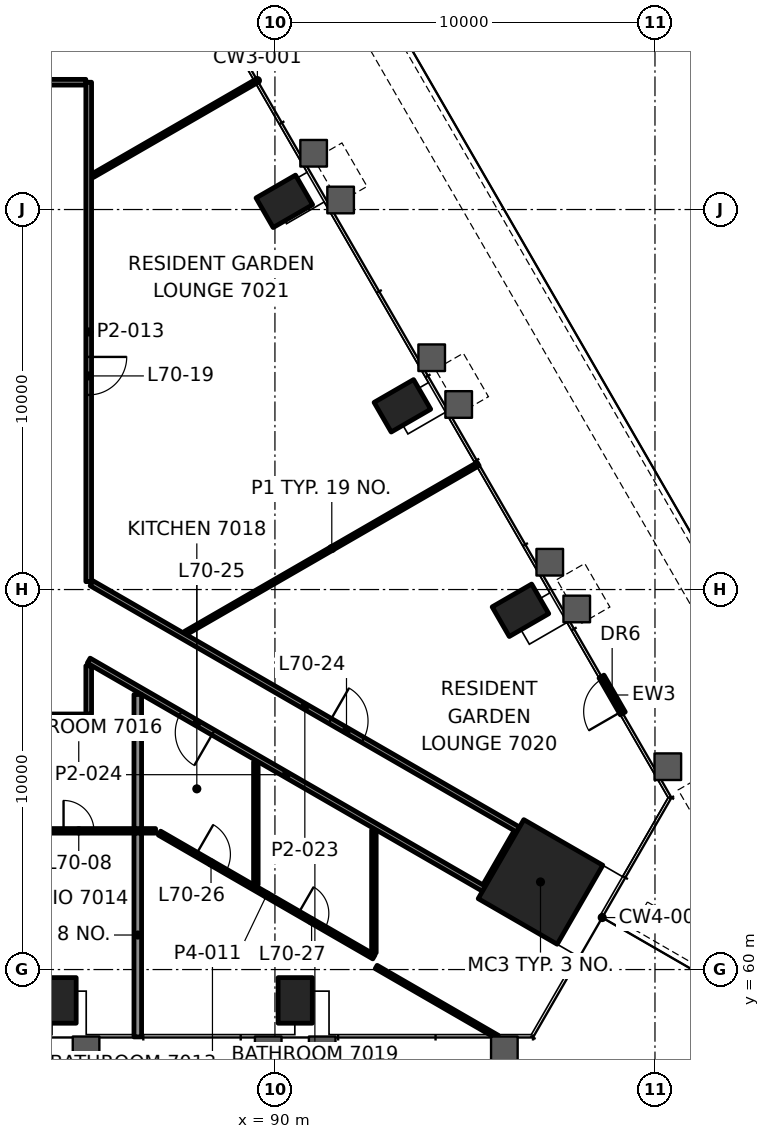
"""IFC4 building model, lengths in metres.
Left out: names, types, materials, properties, quantities, classifications, styles, units other than length and angle.
Written with IfcOpenShell. Run it as: python <this file> out.ifc"""

import sys

from ifc_helpers import new_model, si_unit, direction, frame, frame_2d, origin, origin_2d, place, context, subcontext, project, spatial, rectangle, hollow_rectangle, extrude, element, fill, save


model = new_model("IFC4")
c1 = context("Model", 3, precision=1e-05, world=origin(), true_north=direction((0.0, 1.0)))
c2 = subcontext(c1, "Body", "Model", "MODEL_VIEW")
j1 = project(units=[si_unit("LENGTHUNIT", "METRE"), si_unit("PLANEANGLEUNIT", "RADIAN")], contexts=[c1])
p1 = place(None, origin())
s1 = spatial("IfcSite", under=j1, at=p1, CompositionType="ELEMENT")
p2 = place(p1, origin())
s2 = spatial("IfcBuilding", under=s1, at=p2, CompositionType="ELEMENT")
p3 = place(p2, frame((0.0, 0.0, 291.6)))
s3 = spatial("IfcBuildingStorey", under=s2, at=p3, CompositionType="ELEMENT", Elevation=291.6)
p4 = place(p3, frame((96.988, 62.305, 0.0), z_axis=(0.0, 0.0, 1.0), x_axis=(0.5, 0.866025403784, 0.0)))
e1 = element("IfcColumn", 1, at=p4, inside=s3, PredefinedType="COLUMN", context=c2, shape_type="SweptSolid", body=[
    extrude(rectangle(XDim=2.4, YDim=2.4, at=origin_2d()), origin(), (0.0, 0.0, 1.0), 3.5),
])
for number, where, z_axis, x_axis in (
    (2, (84.32, 59.188, -0.0), (0.0, 0.0, 1.0), (1.0, 0.0, 0.0)),
    (3, (90.533, 59.188, -0.0), (0.0, 0.0, 1.0), (1.0, 0.0, 0.0)),
    (4, (96.461, 69.454, -0.0), (0.0, 0.0, 1.0), (-0.5, 0.866, 0.0)),
    (5, (93.354, 74.835, -0.0), (0.0, 0.0, 1.0), (-0.5, 0.866, 0.0)),
    (6, (90.247, 80.216, -0.0), (0.0, 0.0, 1.0), (-0.5, 0.866, 0.0)),
):
    element("IfcColumn", number, at=place(p3, frame(where, z_axis=z_axis, x_axis=x_axis)), inside=s3, PredefinedType="COLUMN", context=c2, shape_type="SweptSolid", body=[
        extrude(hollow_rectangle(XDim=0.9, YDim=1.2, WallThickness=0.06, at=origin_2d()), origin(), (0.0, 0.0, 1.0), 3.5),
    ])
p5 = place(p3, frame((63.141, 63.65, 0.0), z_axis=(0.0, 0.0, 1.0), x_axis=(1.0, 0.0, 0.0)))
e7 = element("IfcWall", 7, at=p5, inside=s3, PredefinedType="PARTITIONING", context=c2, shape_type="SweptSolid", body=[
    extrude(rectangle(XDim=23.718, YDim=0.12, at=frame_2d((11.859, 0.0))), origin(), (0.0, 0.0, 1.0), 2.7),
])
p6 = place(p5, frame((1.276, 0.0, 0.0)))
e8 = element("IfcOpeningElement", 8, at=p6, cuts=e7, PredefinedType="OPENING", context=c2, shape_type="SweptSolid", body=[
    extrude(rectangle(XDim=0.8, YDim=2.1, at=frame_2d((0.4, 1.05))), frame((0.0, 0.07, 0.0), z_axis=(0.0, -1.0, 0.0), x_axis=(1.0, 0.0, 0.0)), (0.0, 0.0, 1.0), 0.14),
])
p7 = place(p5, frame((3.43, 0.0, 0.0)))
e9 = element("IfcOpeningElement", 9, at=p7, cuts=e7, PredefinedType="OPENING", context=c2, shape_type="SweptSolid", body=[
    extrude(rectangle(XDim=0.9, YDim=2.1, at=frame_2d((0.45, 1.05))), frame((0.0, 0.07, 0.0), z_axis=(0.0, -1.0, 0.0), x_axis=(1.0, 0.0, 0.0)), (0.0, 0.0, 1.0), 0.14),
])
p8 = place(p5, frame((5.715, 0.0, 0.0)))
e10 = element("IfcOpeningElement", 10, at=p8, cuts=e7, PredefinedType="OPENING", context=c2, shape_type="SweptSolid", body=[
    extrude(rectangle(XDim=0.9, YDim=2.1, at=frame_2d((0.45, 1.05))), frame((0.0, 0.07, 0.0), z_axis=(0.0, -1.0, 0.0), x_axis=(1.0, 0.0, 0.0)), (0.0, 0.0, 1.0), 0.14),
])
p9 = place(p5, frame((8.87, 0.0, 0.0)))
e11 = element("IfcOpeningElement", 11, at=p9, cuts=e7, PredefinedType="OPENING", context=c2, shape_type="SweptSolid", body=[
    extrude(rectangle(XDim=0.8, YDim=2.1, at=frame_2d((0.4, 1.05))), frame((0.0, 0.07, 0.0), z_axis=(0.0, -1.0, 0.0), x_axis=(1.0, 0.0, 0.0)), (0.0, 0.0, 1.0), 0.14),
])
p10 = place(p5, frame((11.928, 0.0, 0.0)))
e12 = element("IfcOpeningElement", 12, at=p10, cuts=e7, PredefinedType="OPENING", context=c2, shape_type="SweptSolid", body=[
    extrude(rectangle(XDim=0.9, YDim=2.1, at=frame_2d((0.45, 1.05))), frame((0.0, 0.07, 0.0), z_axis=(0.0, -1.0, 0.0), x_axis=(1.0, 0.0, 0.0)), (0.0, 0.0, 1.0), 0.14),
])
p11 = place(p5, frame((15.083, 0.0, 0.0)))
e13 = element("IfcOpeningElement", 13, at=p11, cuts=e7, PredefinedType="OPENING", context=c2, shape_type="SweptSolid", body=[
    extrude(rectangle(XDim=0.8, YDim=2.1, at=frame_2d((0.4, 1.05))), frame((0.0, 0.07, 0.0), z_axis=(0.0, -1.0, 0.0), x_axis=(1.0, 0.0, 0.0)), (0.0, 0.0, 1.0), 0.14),
])
p12 = place(p5, frame((18.141, 0.0, 0.0)))
e14 = element("IfcOpeningElement", 14, at=p12, cuts=e7, PredefinedType="OPENING", context=c2, shape_type="SweptSolid", body=[
    extrude(rectangle(XDim=0.9, YDim=2.1, at=frame_2d((0.45, 1.05))), frame((0.0, 0.07, 0.0), z_axis=(0.0, -1.0, 0.0), x_axis=(1.0, 0.0, 0.0)), (0.0, 0.0, 1.0), 0.14),
])
p13 = place(p5, frame((21.297, 0.0, 0.0)))
e15 = element("IfcOpeningElement", 15, at=p13, cuts=e7, PredefinedType="OPENING", context=c2, shape_type="SweptSolid", body=[
    extrude(rectangle(XDim=0.8, YDim=2.1, at=frame_2d((0.4, 1.05))), frame((0.0, 0.07, 0.0), z_axis=(0.0, -1.0, 0.0), x_axis=(1.0, 0.0, 0.0)), (0.0, 0.0, 1.0), 0.14),
])
p14 = place(p3, frame((85.1, 66.65, 0.0), z_axis=(0.0, 0.0, 1.0), x_axis=(-1.0, 0.0, 0.0)))
e16 = element("IfcWall", 16, at=p14, inside=s3, PredefinedType="PARTITIONING", context=c2, shape_type="SweptSolid", body=[
    extrude(rectangle(XDim=20.2, YDim=0.15, at=frame_2d((10.1, 0.0))), origin(), (0.0, 0.0, 1.0), 2.7),
])
p15 = place(p14, frame((2.869, 0.0, 0.0)))
e17 = element("IfcOpeningElement", 17, at=p15, cuts=e16, PredefinedType="OPENING", context=c2, shape_type="SweptSolid", body=[
    extrude(rectangle(XDim=1.0, YDim=2.1, at=frame_2d((0.5, 1.05))), frame((0.0, 0.085, 0.0), z_axis=(0.0, -1.0, 0.0), x_axis=(1.0, 0.0, 0.0)), (0.0, 0.0, 1.0), 0.17),
])
p16 = place(p14, frame((9.082, 0.0, 0.0)))
e18 = element("IfcOpeningElement", 18, at=p16, cuts=e16, PredefinedType="OPENING", context=c2, shape_type="SweptSolid", body=[
    extrude(rectangle(XDim=1.0, YDim=2.1, at=frame_2d((0.5, 1.05))), frame((0.0, 0.085, 0.0), z_axis=(0.0, -1.0, 0.0), x_axis=(1.0, 0.0, 0.0)), (0.0, 0.0, 1.0), 0.17),
])
p17 = place(p14, frame((15.296, 0.0, 0.0)))
e19 = element("IfcOpeningElement", 19, at=p17, cuts=e16, PredefinedType="OPENING", context=c2, shape_type="SweptSolid", body=[
    extrude(rectangle(XDim=1.0, YDim=2.1, at=frame_2d((0.5, 1.05))), frame((0.0, 0.085, 0.0), z_axis=(0.0, -1.0, 0.0), x_axis=(1.0, 0.0, 0.0)), (0.0, 0.0, 1.0), 0.17),
])
p18 = place(p3, frame((78.2, 83.35, 0.0), z_axis=(0.0, 0.0, 1.0), x_axis=(1.0, 0.0, 0.0)))
e20 = element("IfcWall", 20, at=p18, inside=s3, PredefinedType="PARTITIONING", context=c2, shape_type="SweptSolid", body=[
    extrude(rectangle(XDim=6.824, YDim=0.15, at=frame_2d((3.412, 0.0))), origin(), (0.0, 0.0, 1.0), 2.7),
])
p19 = place(p18, frame((2.912, 0.0, 0.0)))
e21 = element("IfcOpeningElement", 21, at=p19, cuts=e20, PredefinedType="OPENING", context=c2, shape_type="SweptSolid", body=[
    extrude(rectangle(XDim=1.0, YDim=2.1, at=frame_2d((0.5, 1.05))), frame((0.0, 0.085, 0.0), z_axis=(0.0, -1.0, 0.0), x_axis=(1.0, 0.0, 0.0)), (0.0, 0.0, 1.0), 0.17),
])
p20 = place(p3, frame((87.645, 68.855, 0.0), z_axis=(0.0, 0.0, 1.0), x_axis=(0.866023307551, 0.500003630766, 0.0)))
e22 = element("IfcWall", 22, at=p20, inside=s3, PredefinedType="PARTITIONING", context=c2, shape_type="SweptSolid", body=[
    extrude(rectangle(XDim=8.894, YDim=0.1, at=frame_2d((4.447, 0.0))), origin(), (0.0, 0.0, 1.0), 2.688),
])
p21 = place(p3, frame((85.201, 80.89, 0.0), z_axis=(0.0, 0.0, 1.0), x_axis=(0.866025995923, 0.499998974385, 0.0)))
e23 = element("IfcWall", 23, at=p21, inside=s3, PredefinedType="PARTITIONING", context=c2, shape_type="SweptSolid", body=[
    extrude(rectangle(XDim=4.993, YDim=0.1, at=frame_2d((2.497, 0.0))), origin(), (0.0, 0.0, 1.0), 2.688),
])
p22 = place(p3, frame((95.536, 62.191, 0.0), z_axis=(0.0, 0.0, 1.0), x_axis=(0.500008692254, 0.866020385251, 0.0)))
e24 = element("IfcWall", 24, at=p22, inside=s3, PredefinedType="PARTITIONING", context=c2, shape_type="SweptSolid", body=[
    extrude(rectangle(XDim=1.649, YDim=0.15, at=frame_2d((0.824, 0.0))), origin(), (0.0, 0.0, 1.0), 2.547),
])
p23 = place(p3, frame((92.604, 60.442, 0.0), z_axis=(0.0, 0.0, 1.0), x_axis=(0.0, 1.0, 0.0)))
e25 = element("IfcWall", 25, at=p23, inside=s3, PredefinedType="PARTITIONING", context=c2, shape_type="SweptSolid", body=[
    extrude(rectangle(XDim=3.228, YDim=0.12, at=frame_2d((1.614, 0.0))), origin(), (0.0, 0.0, 1.0), 2.7),
])
p24 = place(p3, frame((89.498, 62.236, 0.0), z_axis=(0.0, 0.0, 1.0), x_axis=(0.0, 1.0, 0.0)))
e26 = element("IfcWall", 26, at=p24, inside=s3, PredefinedType="PARTITIONING", context=c2, shape_type="SweptSolid", body=[
    extrude(rectangle(XDim=3.228, YDim=0.12, at=frame_2d((1.614, 0.0))), origin(), (0.0, 0.0, 1.0), 2.547),
])
p25 = place(p3, frame((86.391, 58.228, 0.0), z_axis=(0.0, 0.0, 1.0), x_axis=(0.0, 1.0, 0.0)))
e27 = element("IfcWall", 27, at=p25, inside=s3, PredefinedType="PARTITIONING", context=c2, shape_type="SweptSolid", body=[
    extrude(rectangle(XDim=5.363, YDim=0.2, at=frame_2d((2.681, 0.0))), origin(), (0.0, 0.0, 1.0), 2.7),
])
p26 = place(p3, frame((85.1, 66.725, 0.0), z_axis=(0.0, 0.0, 1.0), x_axis=(0.0, 1.0, 0.0)))
e28 = element("IfcWall", 28, at=p26, inside=s3, PredefinedType="PARTITIONING", context=c2, shape_type="SweptSolid", body=[
    extrude(rectangle(XDim=1.268, YDim=0.15, at=frame_2d((0.634, 0.0))), origin(), (0.0, 0.0, 1.0), 2.547),
])
p27 = place(p3, frame((85.1, 83.35, 0.0), z_axis=(0.0, 0.0, 1.0), x_axis=(0.0, -1.0, 0.0)))
e29 = element("IfcWall", 29, at=p27, inside=s3, PredefinedType="PARTITIONING", context=c2, shape_type="SweptSolid", body=[
    extrude(rectangle(XDim=13.142, YDim=0.15, at=frame_2d((6.571, 0.0))), origin(), (0.0, 0.0, 1.0), 2.7),
])
p28 = place(p27, frame((7.228, 0.0, 0.0)))
e30 = element("IfcOpeningElement", 30, at=p28, cuts=e29, PredefinedType="OPENING", context=c2, shape_type="SweptSolid", body=[
    extrude(rectangle(XDim=1.0, YDim=2.1, at=frame_2d((0.5, 1.05))), frame((0.0, 0.085, 0.0), z_axis=(0.0, -1.0, 0.0), x_axis=(1.0, 0.0, 0.0)), (0.0, 0.0, 1.0), 0.17),
])
p29 = place(p3, frame((85.175, 70.165, 0.0), z_axis=(0.0, 0.0, 1.0), x_axis=(0.866023706001, -0.500002940635, 0.0)))
e31 = element("IfcWall", 31, at=p29, inside=s3, PredefinedType="PARTITIONING", context=c2, shape_type="SweptSolid", body=[
    extrude(rectangle(XDim=12.959, YDim=0.15, at=frame_2d((6.48, 0.0))), origin(), (0.0, 0.0, 1.0), 2.7),
])
p30 = place(p29, frame((7.246, 0.0, 0.0)))
e32 = element("IfcOpeningElement", 32, at=p30, cuts=e31, PredefinedType="OPENING", context=c2, shape_type="SweptSolid", body=[
    extrude(rectangle(XDim=1.0, YDim=2.1, at=frame_2d((0.5, 1.05))), frame((0.0, 0.085, 0.0), z_axis=(0.0, -1.0, 0.0), x_axis=(1.0, 0.0, 0.0)), (0.0, 0.0, 1.0), 0.17),
])
p31 = place(p3, frame((95.498, 62.126, 0.0), z_axis=(0.0, 0.0, 1.0), x_axis=(-0.866024746207, 0.500001138955, 0.0)))
e33 = element("IfcWall", 33, at=p31, inside=s3, PredefinedType="PARTITIONING", context=c2, shape_type="SweptSolid", body=[
    extrude(rectangle(XDim=12.007, YDim=0.15, at=frame_2d((6.003, 0.0))), origin(), (0.0, 0.0, 1.0), 2.547),
])
p32 = place(p31, frame((8.222, 0.0, 0.0)))
e34 = element("IfcOpeningElement", 34, at=p32, cuts=e33, PredefinedType="OPENING", context=c2, shape_type="SweptSolid", body=[
    extrude(rectangle(XDim=1.0, YDim=2.1, at=frame_2d((0.5, 1.05))), frame((0.0, 0.085, 0.0), z_axis=(0.0, -1.0, 0.0), x_axis=(1.0, 0.0, 0.0)), (0.0, 0.0, 1.0), 0.17),
])
p33 = place(p3, frame((86.963, 63.59, 0.0), z_axis=(0.0, 0.0, 1.0), x_axis=(0.866025198843, -0.500000354968, 0.0)))
e35 = element("IfcWall", 35, at=p33, inside=s3, PredefinedType="PARTITIONING", context=c2, shape_type="SweptSolid", body=[
    extrude(rectangle(XDim=6.515, YDim=0.12, at=frame_2d((3.257, 0.0))), origin(), (0.0, 0.0, 1.0), 2.7),
])
p34 = place(p33, frame((1.115, 0.0, 0.0)))
e36 = element("IfcOpeningElement", 36, at=p34, cuts=e35, PredefinedType="OPENING", context=c2, shape_type="SweptSolid", body=[
    extrude(rectangle(XDim=0.9, YDim=2.1, at=frame_2d((0.45, 1.05))), frame((0.0, 0.07, 0.0), z_axis=(0.0, -1.0, 0.0), x_axis=(1.0, 0.0, 0.0)), (0.0, 0.0, 1.0), 0.14),
])
p35 = place(p33, frame((4.221, 0.0, 0.0)))
e37 = element("IfcOpeningElement", 37, at=p35, cuts=e35, PredefinedType="OPENING", context=c2, shape_type="SweptSolid", body=[
    extrude(rectangle(XDim=0.8, YDim=2.1, at=frame_2d((0.4, 1.05))), frame((0.0, 0.07, 0.0), z_axis=(0.0, -1.0, 0.0), x_axis=(1.0, 0.0, 0.0)), (0.0, 0.0, 1.0), 0.14),
])
p36 = place(p3, frame((95.851, 58.228, 0.0), z_axis=(0.0, 0.0, 1.0), x_axis=(-0.866025356753, 0.50000008146, 0.0)))
e38 = element("IfcWall", 38, at=p36, inside=s3, PredefinedType="PARTITIONING", context=c2, shape_type="SweptSolid", body=[
    extrude(rectangle(XDim=3.679, YDim=0.1, at=frame_2d((1.84, 0.0))), origin(), (0.0, 0.0, 1.0), 2.7),
])
p37 = place(p3, frame((86.391, 63.71, 0.0), z_axis=(0.0, 0.0, 1.0), x_axis=(0.0, 1.0, 0.0)))
e39 = element("IfcWall", 39, at=p37, inside=s3, PredefinedType="PARTITIONING", context=c2, shape_type="SweptSolid", body=[
    extrude(rectangle(XDim=3.528, YDim=0.2, at=frame_2d((1.764, 0.0))), origin(), (0.0, 0.0, 1.0), 2.547),
])
p38 = place(p3, frame((99.601, 61.432, 0.0), z_axis=(0.0, 0.0, 1.0), x_axis=(0.866008176907, -0.50002983664, 0.0)))
e40 = element("IfcWall", 40, at=p38, inside=s3, PredefinedType="SOLIDWALL", context=c2, shape_type="SweptSolid", body=[
    extrude(rectangle(XDim=2.2, YDim=0.8, at=frame_2d((1.1, 0.0))), origin(), (0.0, 0.0, 1.0), 0.9),
])
p39 = place(p3, frame((104.039, 65.027, 0.0), z_axis=(0.0, 0.0, 1.0), x_axis=(-0.499997313161, 0.866026955026, 0.0)))
e41 = element("IfcWall", 41, at=p39, inside=s3, PredefinedType="SOLIDWALL", context=c2, shape_type="SweptSolid", body=[
    extrude(rectangle(XDim=46.312, YDim=0.8, at=frame_2d((23.156, 0.0))), origin(), (0.0, 0.0, 1.0), 0.9),
])
p40 = place(p13, origin())
e42 = element("IfcDoor", 42, at=p40, inside=s3, OperationType="SINGLE_SWING_LEFT", PredefinedType="DOOR", context=c2, shape_type="SweptSolid", body=[
    extrude(rectangle(XDim=0.8, YDim=2.1, at=frame_2d((0.4, 1.05))), frame((0.0, 0.025, 0.0), z_axis=(0.0, -1.0, 0.0), x_axis=(1.0, 0.0, 0.0)), (0.0, 0.0, 1.0), 0.05),
])
fill(e15, e42)
p41 = place(p28, origin())
e43 = element("IfcDoor", 43, at=p41, inside=s3, OperationType="SINGLE_SWING_LEFT", PredefinedType="DOOR", context=c2, shape_type="SweptSolid", body=[
    extrude(rectangle(XDim=1.0, YDim=2.1, at=frame_2d((0.5, 1.05))), frame((0.0, 0.025, 0.0), z_axis=(0.0, -1.0, 0.0), x_axis=(1.0, 0.0, 0.0)), (0.0, 0.0, 1.0), 0.05),
])
fill(e30, e43)
p42 = place(p30, origin())
e44 = element("IfcDoor", 44, at=p42, inside=s3, OperationType="SINGLE_SWING_RIGHT", PredefinedType="DOOR", context=c2, shape_type="SweptSolid", body=[
    extrude(rectangle(XDim=1.0, YDim=2.1, at=frame_2d((0.5, 1.05))), frame((0.0, 0.025, 0.0), z_axis=(0.0, -1.0, 0.0), x_axis=(1.0, 0.0, 0.0)), (0.0, 0.0, 1.0), 0.05),
])
fill(e32, e44)
p43 = place(p32, origin())
e45 = element("IfcDoor", 45, at=p43, inside=s3, OperationType="SINGLE_SWING_LEFT", PredefinedType="DOOR", context=c2, shape_type="SweptSolid", body=[
    extrude(rectangle(XDim=1.0, YDim=2.1, at=frame_2d((0.5, 1.05))), frame((0.0, 0.025, 0.0), z_axis=(0.0, -1.0, 0.0), x_axis=(1.0, 0.0, 0.0)), (0.0, 0.0, 1.0), 0.05),
])
fill(e34, e45)
p44 = place(p34, origin())
e46 = element("IfcDoor", 46, at=p44, inside=s3, OperationType="SINGLE_SWING_LEFT", PredefinedType="DOOR", context=c2, shape_type="SweptSolid", body=[
    extrude(rectangle(XDim=0.9, YDim=2.1, at=frame_2d((0.45, 1.05))), frame((0.0, 0.025, 0.0), z_axis=(0.0, -1.0, 0.0), x_axis=(1.0, 0.0, 0.0)), (0.0, 0.0, 1.0), 0.05),
])
fill(e36, e46)
p45 = place(p35, origin())
e47 = element("IfcDoor", 47, at=p45, inside=s3, OperationType="SINGLE_SWING_LEFT", PredefinedType="DOOR", context=c2, shape_type="SweptSolid", body=[
    extrude(rectangle(XDim=0.8, YDim=2.1, at=frame_2d((0.4, 1.05))), frame((0.0, 0.025, 0.0), z_axis=(0.0, -1.0, 0.0), x_axis=(1.0, 0.0, 0.0)), (0.0, 0.0, 1.0), 0.05),
])
fill(e37, e47)
p46 = place(p3, frame((99.153, 66.74, 0.0), z_axis=(0.0, 0.0, 1.0), x_axis=(-0.500030632641, 0.866007717299, 0.0)))
p47 = place(p46, frame((0.06, 0.0, 0.0)))
p48 = place(p47, origin())
e48 = element("IfcDoor", 48, at=p48, inside=s3, OperationType="SINGLE_SWING_LEFT", PredefinedType="DOOR", context=c2, shape_type="SweptSolid", body=[
    extrude(rectangle(XDim=1.0, YDim=2.1, at=frame_2d((0.5, 1.05))), frame((0.0, 0.025, 0.0), z_axis=(0.0, -1.0, 0.0), x_axis=(1.0, 0.0, 0.0)), (0.0, 0.0, 1.0), 0.05),
])
save(model, sys.argv[1])
